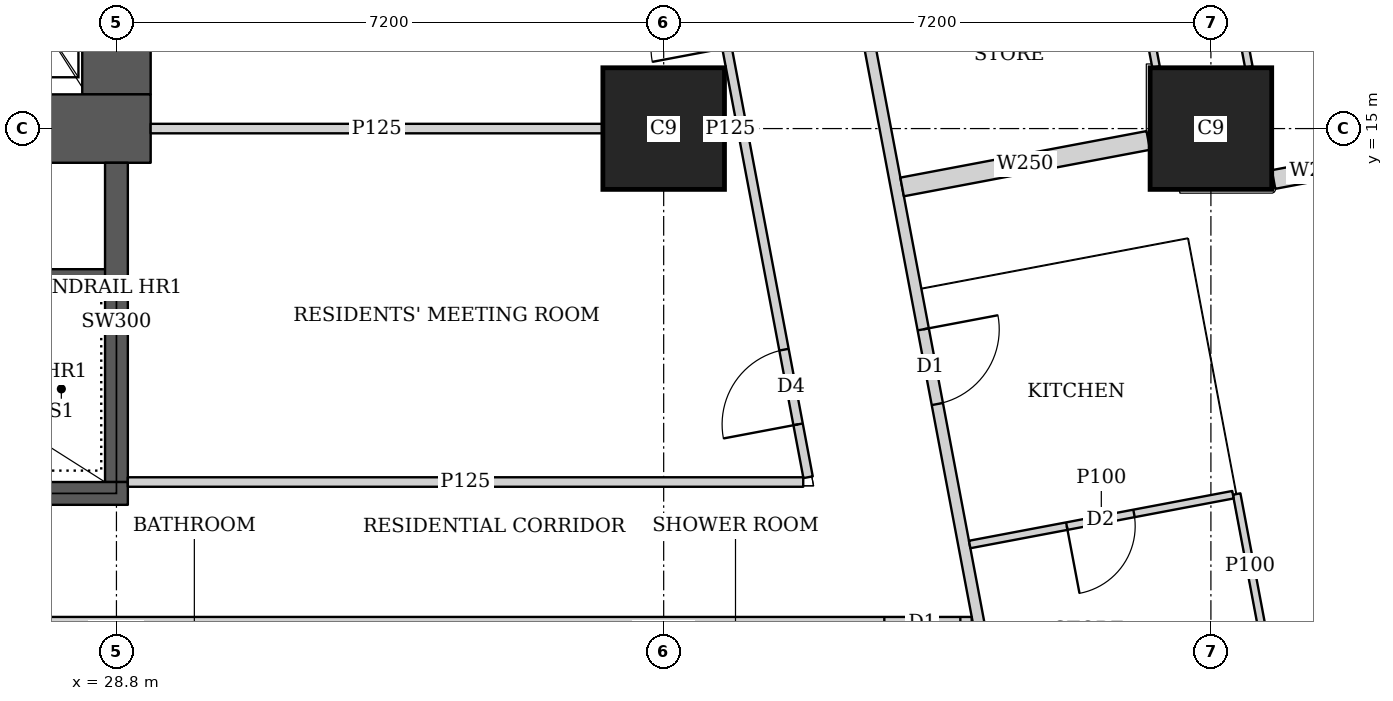
"""IFC4 building model, lengths in metres.
Left out: names, types, materials, properties, quantities, classifications, styles, units other than length and angle.
Written with IfcOpenShell. Run it as: python <this file> out.ifc"""

import sys

from ifc_helpers import new_model, si_unit, direction, frame, frame_2d, origin, origin_2d, place, context, subcontext, project, spatial, rectangle, extrude, element, fill, save


model = new_model("IFC4")
c1 = context("Model", 3, precision=1e-05, world=origin(), true_north=direction((0.0, 1.0)))
c2 = subcontext(c1, "Body", "Model", "MODEL_VIEW")
j1 = project(units=[si_unit("LENGTHUNIT", "METRE"), si_unit("PLANEANGLEUNIT", "RADIAN")], contexts=[c1])
p1 = place(None, origin())
s1 = spatial("IfcSite", under=j1, at=p1, CompositionType="ELEMENT")
p2 = place(p1, origin())
s2 = spatial("IfcBuilding", under=s1, at=p2, CompositionType="ELEMENT")
p3 = place(p2, frame((0.0, 0.0, 89.15)))
s3 = spatial("IfcBuildingStorey", under=s2, at=p3, CompositionType="ELEMENT", Elevation=89.15)
for number, where, z_axis, x_axis in (
    (1, (36.0, 15.0, 0.0), (0.0, 0.0, 1.0), (1.0, 0.0, 0.0)),
    (2, (43.2, 15.0, 0.0), (0.0, 0.0, 1.0), (1.0, 0.0, 0.0)),
):
    element("IfcColumn", number, at=place(p3, frame(where, z_axis=z_axis, x_axis=x_axis)), inside=s3, PredefinedType="COLUMN", context=c2, shape_type="SweptSolid", body=[
        extrude(rectangle(XDim=1.6, YDim=1.6, at=origin_2d()), origin(), (0.0, 0.0, 1.0), 3.75),
    ])
p4 = place(p3, frame((13.95, 15.0, 0.0), z_axis=(0.0, 0.0, 1.0), x_axis=(1.0, 0.0, 0.0)))
e3 = element("IfcWall", 3, at=p4, inside=s3, PredefinedType="SHEAR", context=c2, shape_type="SweptSolid", body=[
    extrude(rectangle(XDim=15.3, YDim=0.9, at=frame_2d((7.65, 0.0))), origin(), (0.0, 0.0, 1.0), 3.75),
])
p5 = place(p4, frame((4.45, 0.0, 0.0)))
e4 = element("IfcOpeningElement", 4, at=p5, cuts=e3, PredefinedType="OPENING", context=c2, shape_type="SweptSolid", body=[
    extrude(rectangle(XDim=1.8, YDim=2.1, at=frame_2d((0.9, 1.05))), frame((0.0, 0.46, 0.0), z_axis=(0.0, -1.0, 0.0), x_axis=(1.0, 0.0, 0.0)), (0.0, 0.0, 1.0), 0.92),
])
p6 = place(p4, frame((10.7, 0.0, 0.0)))
e5 = element("IfcOpeningElement", 5, at=p6, cuts=e3, PredefinedType="OPENING", context=c2, shape_type="SweptSolid", body=[
    extrude(rectangle(XDim=1.1, YDim=2.1, at=frame_2d((0.55, 1.05))), frame((0.0, 0.46, 0.0), z_axis=(0.0, -1.0, 0.0), x_axis=(1.0, 0.0, 0.0)), (0.0, 0.0, 1.0), 0.92),
])
p7 = place(p3, frame((28.8, 15.45, 0.0), z_axis=(0.0, 0.0, 1.0), x_axis=(0.0, 1.0, 0.0)))
e6 = element("IfcWall", 6, at=p7, inside=s3, PredefinedType="SHEAR", context=c2, shape_type="SweptSolid", body=[
    extrude(rectangle(XDim=14.1, YDim=0.9, at=frame_2d((7.05, 0.0))), origin(), (0.0, 0.0, 1.0), 3.75),
])
p8 = place(p3, frame((21.45, 10.2, 0.0), z_axis=(0.0, 0.0, 1.0), x_axis=(1.0, 0.0, 0.0)))
e7 = element("IfcWall", 7, at=p8, inside=s3, PredefinedType="SHEAR", context=c2, shape_type="SweptSolid", body=[
    extrude(rectangle(XDim=7.5, YDim=0.3, at=frame_2d((3.75, 0.0))), origin(), (0.0, 0.0, 1.0), 3.75),
])
p9 = place(p8, frame((0.5, 0.0, 0.0)))
e8 = element("IfcOpeningElement", 8, at=p9, cuts=e7, PredefinedType="OPENING", context=c2, shape_type="SweptSolid", body=[
    extrude(rectangle(XDim=1.1, YDim=2.1, at=frame_2d((0.55, 1.05))), frame((0.0, 0.16, 0.0), z_axis=(0.0, -1.0, 0.0), x_axis=(1.0, 0.0, 0.0)), (0.0, 0.0, 1.0), 0.32),
])
p10 = place(p3, frame((28.8, 10.35, 0.0), z_axis=(0.0, 0.0, 1.0), x_axis=(0.0, 1.0, 0.0)))
e9 = element("IfcWall", 9, at=p10, inside=s3, PredefinedType="SHEAR", context=c2, shape_type="SweptSolid", body=[
    extrude(rectangle(XDim=4.2, YDim=0.3, at=frame_2d((2.1, 0.0))), origin(), (0.0, 0.0, 1.0), 3.75),
])
p11 = place(p3, frame((50.653, 2.703, 0.0), z_axis=(0.0, 0.0, 1.0), x_axis=(-0.185612026696, 0.982623109613, 0.0)))
e10 = element("IfcWall", 10, at=p11, inside=s3, PredefinedType="SOLIDWALL", context=c2, shape_type="SweptSolid", body=[
    extrude(rectangle(XDim=41.393, YDim=0.2, at=frame_2d((20.697, 0.0))), origin(), (0.0, 0.0, 1.0), 3.5),
])
p12 = place(p11, frame((1.633, 0.0, 0.9)))
e11 = element("IfcOpeningElement", 11, at=p12, cuts=e10, PredefinedType="OPENING", context=c2, shape_type="SweptSolid", body=[
    extrude(rectangle(XDim=1.8, YDim=1.5, at=frame_2d((0.9, 0.75))), frame((0.0, 0.11, 0.0), z_axis=(0.0, -1.0, 0.0), x_axis=(1.0, 0.0, 0.0)), (0.0, 0.0, 1.0), 0.22),
])
p13 = place(p11, frame((6.032, 0.0, 0.9)))
e12 = element("IfcOpeningElement", 12, at=p13, cuts=e10, PredefinedType="OPENING", context=c2, shape_type="SweptSolid", body=[
    extrude(rectangle(XDim=1.8, YDim=1.5, at=frame_2d((0.9, 0.75))), frame((0.0, 0.11, 0.0), z_axis=(0.0, -1.0, 0.0), x_axis=(1.0, 0.0, 0.0)), (0.0, 0.0, 1.0), 0.22),
])
p14 = place(p11, frame((9.848, 0.0, 0.9)))
e13 = element("IfcOpeningElement", 13, at=p14, cuts=e10, PredefinedType="OPENING", context=c2, shape_type="SweptSolid", body=[
    extrude(rectangle(XDim=1.8, YDim=1.5, at=frame_2d((0.9, 0.75))), frame((0.0, 0.11, 0.0), z_axis=(0.0, -1.0, 0.0), x_axis=(1.0, 0.0, 0.0)), (0.0, 0.0, 1.0), 0.22),
])
p15 = place(p11, frame((13.664, 0.0, 0.9)))
e14 = element("IfcOpeningElement", 14, at=p15, cuts=e10, PredefinedType="OPENING", context=c2, shape_type="SweptSolid", body=[
    extrude(rectangle(XDim=1.8, YDim=1.5, at=frame_2d((0.9, 0.75))), frame((0.0, 0.11, 0.0), z_axis=(0.0, -1.0, 0.0), x_axis=(1.0, 0.0, 0.0)), (0.0, 0.0, 1.0), 0.22),
])
p16 = place(p11, frame((17.481, 0.0, 0.9)))
e15 = element("IfcOpeningElement", 15, at=p16, cuts=e10, PredefinedType="OPENING", context=c2, shape_type="SweptSolid", body=[
    extrude(rectangle(XDim=1.8, YDim=1.5, at=frame_2d((0.9, 0.75))), frame((0.0, 0.11, 0.0), z_axis=(0.0, -1.0, 0.0), x_axis=(1.0, 0.0, 0.0)), (0.0, 0.0, 1.0), 0.22),
])
p17 = place(p11, frame((21.297, 0.0, 0.9)))
e16 = element("IfcOpeningElement", 16, at=p17, cuts=e10, PredefinedType="OPENING", context=c2, shape_type="SweptSolid", body=[
    extrude(rectangle(XDim=1.8, YDim=1.5, at=frame_2d((0.9, 0.75))), frame((0.0, 0.11, 0.0), z_axis=(0.0, -1.0, 0.0), x_axis=(1.0, 0.0, 0.0)), (0.0, 0.0, 1.0), 0.22),
])
p18 = place(p11, frame((25.113, 0.0, 0.9)))
e17 = element("IfcOpeningElement", 17, at=p18, cuts=e10, PredefinedType="OPENING", context=c2, shape_type="SweptSolid", body=[
    extrude(rectangle(XDim=1.8, YDim=1.5, at=frame_2d((0.9, 0.75))), frame((0.0, 0.11, 0.0), z_axis=(0.0, -1.0, 0.0), x_axis=(1.0, 0.0, 0.0)), (0.0, 0.0, 1.0), 0.22),
])
p19 = place(p11, frame((28.93, 0.0, 0.9)))
e18 = element("IfcOpeningElement", 18, at=p19, cuts=e10, PredefinedType="OPENING", context=c2, shape_type="SweptSolid", body=[
    extrude(rectangle(XDim=1.8, YDim=1.5, at=frame_2d((0.9, 0.75))), frame((0.0, 0.11, 0.0), z_axis=(0.0, -1.0, 0.0), x_axis=(1.0, 0.0, 0.0)), (0.0, 0.0, 1.0), 0.22),
])
p20 = place(p11, frame((32.746, 0.0, 0.9)))
e19 = element("IfcOpeningElement", 19, at=p20, cuts=e10, PredefinedType="OPENING", context=c2, shape_type="SweptSolid", body=[
    extrude(rectangle(XDim=1.8, YDim=1.5, at=frame_2d((0.9, 0.75))), frame((0.0, 0.11, 0.0), z_axis=(0.0, -1.0, 0.0), x_axis=(1.0, 0.0, 0.0)), (0.0, 0.0, 1.0), 0.22),
])
p21 = place(p11, frame((36.481, 0.0, 0.9)))
e20 = element("IfcOpeningElement", 20, at=p21, cuts=e10, PredefinedType="OPENING", context=c2, shape_type="SweptSolid", body=[
    extrude(rectangle(XDim=1.8, YDim=1.5, at=frame_2d((0.9, 0.75))), frame((0.0, 0.11, 0.0), z_axis=(0.0, -1.0, 0.0), x_axis=(1.0, 0.0, 0.0)), (0.0, 0.0, 1.0), 0.22),
])
p22 = place(p3, frame((40.053, 8.5, 0.0), z_axis=(0.0, 0.0, 1.0), x_axis=(-1.0, 0.0, 0.0)))
e21 = element("IfcWall", 21, at=p22, inside=s3, PredefinedType="SOLIDWALL", context=c2, shape_type="SweptSolid", body=[
    extrude(rectangle(XDim=31.703, YDim=0.15, at=frame_2d((15.852, 0.0))), origin(), (0.0, 0.0, 1.0), 3.5),
])
p23 = place(p22, frame((28.103, 0.0, 0.0)))
e22 = element("IfcOpeningElement", 22, at=p23, cuts=e21, PredefinedType="OPENING", context=c2, shape_type="SweptSolid", body=[
    extrude(rectangle(XDim=1.0, YDim=2.1, at=frame_2d((0.5, 1.05))), frame((0.0, 0.085, 0.0), z_axis=(0.0, -1.0, 0.0), x_axis=(1.0, 0.0, 0.0)), (0.0, 0.0, 1.0), 0.17),
])
p24 = place(p22, frame((19.953, 0.0, 0.0)))
e23 = element("IfcOpeningElement", 23, at=p24, cuts=e21, PredefinedType="OPENING", context=c2, shape_type="SweptSolid", body=[
    extrude(rectangle(XDim=1.0, YDim=2.1, at=frame_2d((0.5, 1.05))), frame((0.0, 0.085, 0.0), z_axis=(0.0, -1.0, 0.0), x_axis=(1.0, 0.0, 0.0)), (0.0, 0.0, 1.0), 0.17),
])
p25 = place(p22, frame((12.753, 0.0, 0.0)))
e24 = element("IfcOpeningElement", 24, at=p25, cuts=e21, PredefinedType="OPENING", context=c2, shape_type="SweptSolid", body=[
    extrude(rectangle(XDim=1.0, YDim=2.1, at=frame_2d((0.5, 1.05))), frame((0.0, 0.085, 0.0), z_axis=(0.0, -1.0, 0.0), x_axis=(1.0, 0.0, 0.0)), (0.0, 0.0, 1.0), 0.17),
])
p26 = place(p22, frame((0.15, 0.0, 0.0)))
e25 = element("IfcOpeningElement", 25, at=p26, cuts=e21, PredefinedType="OPENING", context=c2, shape_type="SweptSolid", body=[
    extrude(rectangle(XDim=1.0, YDim=2.1, at=frame_2d((0.5, 1.05))), frame((0.0, 0.085, 0.0), z_axis=(0.0, -1.0, 0.0), x_axis=(1.0, 0.0, 0.0)), (0.0, 0.0, 1.0), 0.17),
])
p27 = place(p3, frame((33.127, 45.65, 0.0), z_axis=(0.0, 0.0, 1.0), x_axis=(0.185598547723, -0.98262565562, 0.0)))
e26 = element("IfcWall", 26, at=p27, inside=s3, PredefinedType="SOLIDWALL", context=c2, shape_type="SweptSolid", body=[
    extrude(rectangle(XDim=47.118, YDim=0.15, at=frame_2d((23.559, 0.0))), origin(), (0.0, 0.0, 1.0), 2.2),
])
p28 = place(p27, frame((15.285, 0.0, 0.0)))
e27 = element("IfcOpeningElement", 27, at=p28, cuts=e26, PredefinedType="OPENING", context=c2, shape_type="SweptSolid", body=[
    extrude(rectangle(XDim=1.0, YDim=2.1, at=frame_2d((0.5, 1.05))), frame((0.0, 0.085, 0.0), z_axis=(0.0, -1.0, 0.0), x_axis=(1.0, 0.0, 0.0)), (0.0, 0.0, 1.0), 0.17),
])
p29 = place(p27, frame((19.102, 0.0, 0.0)))
e28 = element("IfcOpeningElement", 28, at=p29, cuts=e26, PredefinedType="OPENING", context=c2, shape_type="SweptSolid", body=[
    extrude(rectangle(XDim=1.0, YDim=2.1, at=frame_2d((0.5, 1.05))), frame((0.0, 0.085, 0.0), z_axis=(0.0, -1.0, 0.0), x_axis=(1.0, 0.0, 0.0)), (0.0, 0.0, 1.0), 0.17),
])
p30 = place(p27, frame((33.88, 0.0, 0.0)))
e29 = element("IfcOpeningElement", 29, at=p30, cuts=e26, PredefinedType="OPENING", context=c2, shape_type="SweptSolid", body=[
    extrude(rectangle(XDim=1.0, YDim=2.1, at=frame_2d((0.5, 1.05))), frame((0.0, 0.085, 0.0), z_axis=(0.0, -1.0, 0.0), x_axis=(1.0, 0.0, 0.0)), (0.0, 0.0, 1.0), 0.17),
])
p31 = place(p3, frame((41.894, 25.366, 0.0), z_axis=(0.0, 0.0, 1.0), x_axis=(0.185599502781, -0.982625475228, 0.0)))
e30 = element("IfcWall", 30, at=p31, inside=s3, PredefinedType="PARTITIONING", context=c2, shape_type="SweptSolid", body=[
    extrude(rectangle(XDim=9.725, YDim=0.1, at=frame_2d((4.862, 0.0))), origin(), (0.0, 0.0, 1.0), 2.5),
])
p32 = place(p31, frame((0.151, 0.0, 0.0)))
e31 = element("IfcOpeningElement", 31, at=p32, cuts=e30, PredefinedType="OPENING", context=c2, shape_type="SweptSolid", body=[
    extrude(rectangle(XDim=0.9, YDim=2.1, at=frame_2d((0.45, 1.05))), frame((0.0, 0.06, 0.0), z_axis=(0.0, -1.0, 0.0), x_axis=(1.0, 0.0, 0.0)), (0.0, 0.0, 1.0), 0.12),
])
p33 = place(p31, frame((5.05, 0.0, 0.0)))
e32 = element("IfcOpeningElement", 32, at=p33, cuts=e30, PredefinedType="OPENING", context=c2, shape_type="SweptSolid", body=[
    extrude(rectangle(XDim=0.9, YDim=2.1, at=frame_2d((0.45, 1.05))), frame((0.0, 0.06, 0.0), z_axis=(0.0, -1.0, 0.0), x_axis=(1.0, 0.0, 0.0)), (0.0, 0.0, 1.0), 0.12),
])
p34 = place(p31, frame((7.783, 0.0, 0.0)))
e33 = element("IfcOpeningElement", 33, at=p34, cuts=e30, PredefinedType="OPENING", context=c2, shape_type="SweptSolid", body=[
    extrude(rectangle(XDim=0.9, YDim=2.1, at=frame_2d((0.45, 1.05))), frame((0.0, 0.06, 0.0), z_axis=(0.0, -1.0, 0.0), x_axis=(1.0, 0.0, 0.0)), (0.0, 0.0, 1.0), 0.12),
])
p35 = place(p3, frame((40.706, 25.192, 0.0), z_axis=(0.0, 0.0, 1.0), x_axis=(0.185591412258, -0.982627003342, 0.0)))
e34 = element("IfcWall", 34, at=p35, inside=s3, PredefinedType="PARTITIONING", context=c2, shape_type="SweptSolid", body=[
    extrude(rectangle(XDim=9.548, YDim=0.1, at=frame_2d((4.774, 0.0))), origin(), (0.0, 0.0, 1.0), 2.5),
])
p36 = place(p35, frame((0.575, 0.0, 0.0)))
e35 = element("IfcOpeningElement", 35, at=p36, cuts=e34, PredefinedType="OPENING", context=c2, shape_type="SweptSolid", body=[
    extrude(rectangle(XDim=0.9, YDim=2.1, at=frame_2d((0.45, 1.05))), frame((0.0, 0.06, 0.0), z_axis=(0.0, -1.0, 0.0), x_axis=(1.0, 0.0, 0.0)), (0.0, 0.0, 1.0), 0.12),
])
p37 = place(p35, frame((4.166, 0.0, 0.0)))
e36 = element("IfcOpeningElement", 36, at=p37, cuts=e34, PredefinedType="OPENING", context=c2, shape_type="SweptSolid", body=[
    extrude(rectangle(XDim=0.9, YDim=2.1, at=frame_2d((0.45, 1.05))), frame((0.0, 0.06, 0.0), z_axis=(0.0, -1.0, 0.0), x_axis=(1.0, 0.0, 0.0)), (0.0, 0.0, 1.0), 0.12),
])
p38 = place(p35, frame((2.483, 0.0, 0.0)))
e37 = element("IfcOpeningElement", 37, at=p38, cuts=e34, PredefinedType="OPENING", context=c2, shape_type="SweptSolid", body=[
    extrude(rectangle(XDim=0.9, YDim=2.1, at=frame_2d((0.45, 1.05))), frame((0.0, 0.06, 0.0), z_axis=(0.0, -1.0, 0.0), x_axis=(1.0, 0.0, 0.0)), (0.0, 0.0, 1.0), 0.12),
])
p39 = place(p35, frame((6.074, 0.0, 0.0)))
e38 = element("IfcOpeningElement", 38, at=p39, cuts=e34, PredefinedType="OPENING", context=c2, shape_type="SweptSolid", body=[
    extrude(rectangle(XDim=0.9, YDim=2.1, at=frame_2d((0.45, 1.05))), frame((0.0, 0.06, 0.0), z_axis=(0.0, -1.0, 0.0), x_axis=(1.0, 0.0, 0.0)), (0.0, 0.0, 1.0), 0.12),
])
p40 = place(p3, frame((43.539, 10.192, 0.0), z_axis=(0.0, 0.0, 1.0), x_axis=(0.185366049966, -0.982669541362, 0.0)))
e39 = element("IfcWall", 39, at=p40, inside=s3, PredefinedType="PARTITIONING", context=c2, shape_type="SweptSolid", body=[
    extrude(rectangle(XDim=1.915, YDim=0.1, at=frame_2d((0.958, 0.0))), origin(), (0.0, 0.0, 1.0), 3.5),
])
p41 = place(p3, frame((43.49, 10.183, 0.0), z_axis=(0.0, 0.0, 1.0), x_axis=(-0.982588017646, -0.185797706064, 0.0)))
e40 = element("IfcWall", 40, at=p41, inside=s3, PredefinedType="PARTITIONING", context=c2, shape_type="SweptSolid", body=[
    extrude(rectangle(XDim=3.525, YDim=0.1, at=frame_2d((1.763, 0.0))), origin(), (0.0, 0.0, 1.0), 3.5),
])
p42 = place(p41, frame((1.325, 0.0, 0.0)))
e41 = element("IfcOpeningElement", 41, at=p42, cuts=e40, PredefinedType="OPENING", context=c2, shape_type="SweptSolid", body=[
    extrude(rectangle(XDim=0.9, YDim=2.1, at=frame_2d((0.45, 1.05))), frame((0.0, 0.06, 0.0), z_axis=(0.0, -1.0, 0.0), x_axis=(1.0, 0.0, 0.0)), (0.0, 0.0, 1.0), 0.12),
])
p43 = place(p3, frame((45.19, 14.55, 0.0), z_axis=(0.0, 0.0, 1.0), x_axis=(-0.982666604435, -0.185381618634, 0.0)))
e42 = element("IfcWall", 42, at=p43, inside=s3, PredefinedType="SOLIDWALL", context=c2, shape_type="SweptSolid", body=[
    extrude(rectangle(XDim=1.187, YDim=0.25, at=frame_2d((0.593, 0.0))), origin(), (0.0, 0.0, 1.0), 3.5),
])
p44 = place(p3, frame((42.376, 14.844, 0.0), z_axis=(0.0, 0.0, 1.0), x_axis=(-0.982610440948, -0.18567908159, 0.0)))
e43 = element("IfcWall", 43, at=p44, inside=s3, PredefinedType="SOLIDWALL", context=c2, shape_type="SweptSolid", body=[
    extrude(rectangle(XDim=3.296, YDim=0.25, at=frame_2d((1.648, 0.0))), origin(), (0.0, 0.0, 1.0), 3.5),
])
p45 = place(p3, frame((28.95, 10.35, 0.0), z_axis=(0.0, 0.0, 1.0), x_axis=(1.0, 0.0, 0.0)))
e44 = element("IfcWall", 44, at=p45, inside=s3, PredefinedType="PARTITIONING", context=c2, shape_type="SweptSolid", body=[
    extrude(rectangle(XDim=8.886, YDim=0.125, at=frame_2d((4.443, 0.0))), origin(), (0.0, 0.0, 1.0), 3.5),
])
p46 = place(p3, frame((37.9, 10.413, 0.0), z_axis=(0.0, 0.0, 1.0), x_axis=(-0.185589740669, 0.982627319058, 0.0)))
e45 = element("IfcWall", 45, at=p46, inside=s3, PredefinedType="PARTITIONING", context=c2, shape_type="SweptSolid", body=[
    extrude(rectangle(XDim=24.602, YDim=0.125, at=frame_2d((12.301, 0.0))), origin(), (0.0, 0.0, 1.0), 2.5),
])
p47 = place(p46, frame((0.708, 0.0, 0.0)))
e46 = element("IfcOpeningElement", 46, at=p47, cuts=e45, PredefinedType="OPENING", context=c2, shape_type="SweptSolid", body=[
    extrude(rectangle(XDim=1.0, YDim=2.1, at=frame_2d((0.5, 1.05))), frame((0.0, 0.073, 0.0), z_axis=(0.0, -1.0, 0.0), x_axis=(1.0, 0.0, 0.0)), (0.0, 0.0, 1.0), 0.145),
])
p48 = place(p46, frame((5.75, 0.0, 0.0)))
e47 = element("IfcOpeningElement", 47, at=p48, cuts=e45, PredefinedType="OPENING", context=c2, shape_type="SweptSolid", body=[
    extrude(rectangle(XDim=1.0, YDim=2.1, at=frame_2d((0.5, 1.05))), frame((0.0, 0.073, 0.0), z_axis=(0.0, -1.0, 0.0), x_axis=(1.0, 0.0, 0.0)), (0.0, 0.0, 1.0), 0.145),
])
p49 = place(p46, frame((13.124, 0.0, 0.0)))
e48 = element("IfcOpeningElement", 48, at=p49, cuts=e45, PredefinedType="OPENING", context=c2, shape_type="SweptSolid", body=[
    extrude(rectangle(XDim=1.0, YDim=2.1, at=frame_2d((0.5, 1.05))), frame((0.0, 0.073, 0.0), z_axis=(0.0, -1.0, 0.0), x_axis=(1.0, 0.0, 0.0)), (0.0, 0.0, 1.0), 0.145),
])
p50 = place(p46, frame((16.94, 0.0, 0.0)))
e49 = element("IfcOpeningElement", 49, at=p50, cuts=e45, PredefinedType="OPENING", context=c2, shape_type="SweptSolid", body=[
    extrude(rectangle(XDim=1.0, YDim=2.1, at=frame_2d((0.5, 1.05))), frame((0.0, 0.073, 0.0), z_axis=(0.0, -1.0, 0.0), x_axis=(1.0, 0.0, 0.0)), (0.0, 0.0, 1.0), 0.145),
])
p51 = place(p46, frame((21.0, 0.0, 0.0)))
e50 = element("IfcOpeningElement", 50, at=p51, cuts=e45, PredefinedType="OPENING", context=c2, shape_type="SweptSolid", body=[
    extrude(rectangle(XDim=1.0, YDim=2.1, at=frame_2d((0.5, 1.05))), frame((0.0, 0.073, 0.0), z_axis=(0.0, -1.0, 0.0), x_axis=(1.0, 0.0, 0.0)), (0.0, 0.0, 1.0), 0.145),
])
p52 = place(p3, frame((29.25, 15.0, 0.0), z_axis=(0.0, 0.0, 1.0), x_axis=(1.0, 0.0, 0.0)))
e51 = element("IfcWall", 51, at=p52, inside=s3, PredefinedType="PARTITIONING", context=c2, shape_type="SweptSolid", body=[
    extrude(rectangle(XDim=5.949, YDim=0.125, at=frame_2d((2.975, 0.0))), origin(), (0.0, 0.0, 1.0), 3.5),
])
p53 = place(p3, frame((36.801, 15.0, 0.0), z_axis=(0.0, 0.0, 1.0), x_axis=(1.0, 0.0, 0.0)))
e52 = element("IfcWall", 52, at=p53, inside=s3, PredefinedType="PARTITIONING", context=c2, shape_type="SweptSolid", body=[
    extrude(rectangle(XDim=0.157, YDim=0.125, at=frame_2d((0.079, 0.0))), origin(), (0.0, 0.0, 1.0), 3.5),
])
p54 = place(p3, frame((23.0, 13.05, 0.0), z_axis=(0.0, 0.0, 1.0), x_axis=(1.0, 0.0, 0.0)))
e53 = element("IfcWall", 53, at=p54, inside=s3, PredefinedType="SHEAR", context=c2, shape_type="SweptSolid", body=[
    extrude(rectangle(XDim=5.8, YDim=0.2, at=frame_2d((2.9, 0.0))), origin(), (0.0, 0.0, 1.0), 3.75),
])
p55 = place(p26, origin())
e54 = element("IfcDoor", 54, at=p55, inside=s3, OperationType="SINGLE_SWING_LEFT", PredefinedType="DOOR", context=c2, shape_type="SweptSolid", body=[
    extrude(rectangle(XDim=1.0, YDim=2.1, at=frame_2d((0.5, 1.05))), frame((0.0, 0.025, 0.0), z_axis=(0.0, -1.0, 0.0), x_axis=(1.0, 0.0, 0.0)), (0.0, 0.0, 1.0), 0.05),
])
fill(e25, e54)
p56 = place(p30, origin())
e55 = element("IfcDoor", 55, at=p56, inside=s3, OperationType="SINGLE_SWING_LEFT", PredefinedType="DOOR", context=c2, shape_type="SweptSolid", body=[
    extrude(rectangle(XDim=1.0, YDim=2.1, at=frame_2d((0.5, 1.05))), frame((0.0, 0.025, 0.0), z_axis=(0.0, -1.0, 0.0), x_axis=(1.0, 0.0, 0.0)), (0.0, 0.0, 1.0), 0.05),
])
fill(e29, e55)
p57 = place(p42, origin())
e56 = element("IfcDoor", 56, at=p57, inside=s3, OperationType="SINGLE_SWING_RIGHT", PredefinedType="DOOR", context=c2, shape_type="SweptSolid", body=[
    extrude(rectangle(XDim=0.9, YDim=2.1, at=frame_2d((0.45, 1.05))), frame((0.0, 0.025, 0.0), z_axis=(0.0, -1.0, 0.0), x_axis=(1.0, 0.0, 0.0)), (0.0, 0.0, 1.0), 0.05),
])
fill(e41, e56)
p58 = place(p47, origin())
e57 = element("IfcDoor", 57, at=p58, inside=s3, OperationType="SINGLE_SWING_LEFT", PredefinedType="DOOR", context=c2, shape_type="SweptSolid", body=[
    extrude(rectangle(XDim=1.0, YDim=2.1, at=frame_2d((0.5, 1.05))), frame((0.0, 0.025, 0.0), z_axis=(0.0, -1.0, 0.0), x_axis=(1.0, 0.0, 0.0)), (0.0, 0.0, 1.0), 0.05),
])
fill(e46, e57)
save(model, sys.argv[1])
